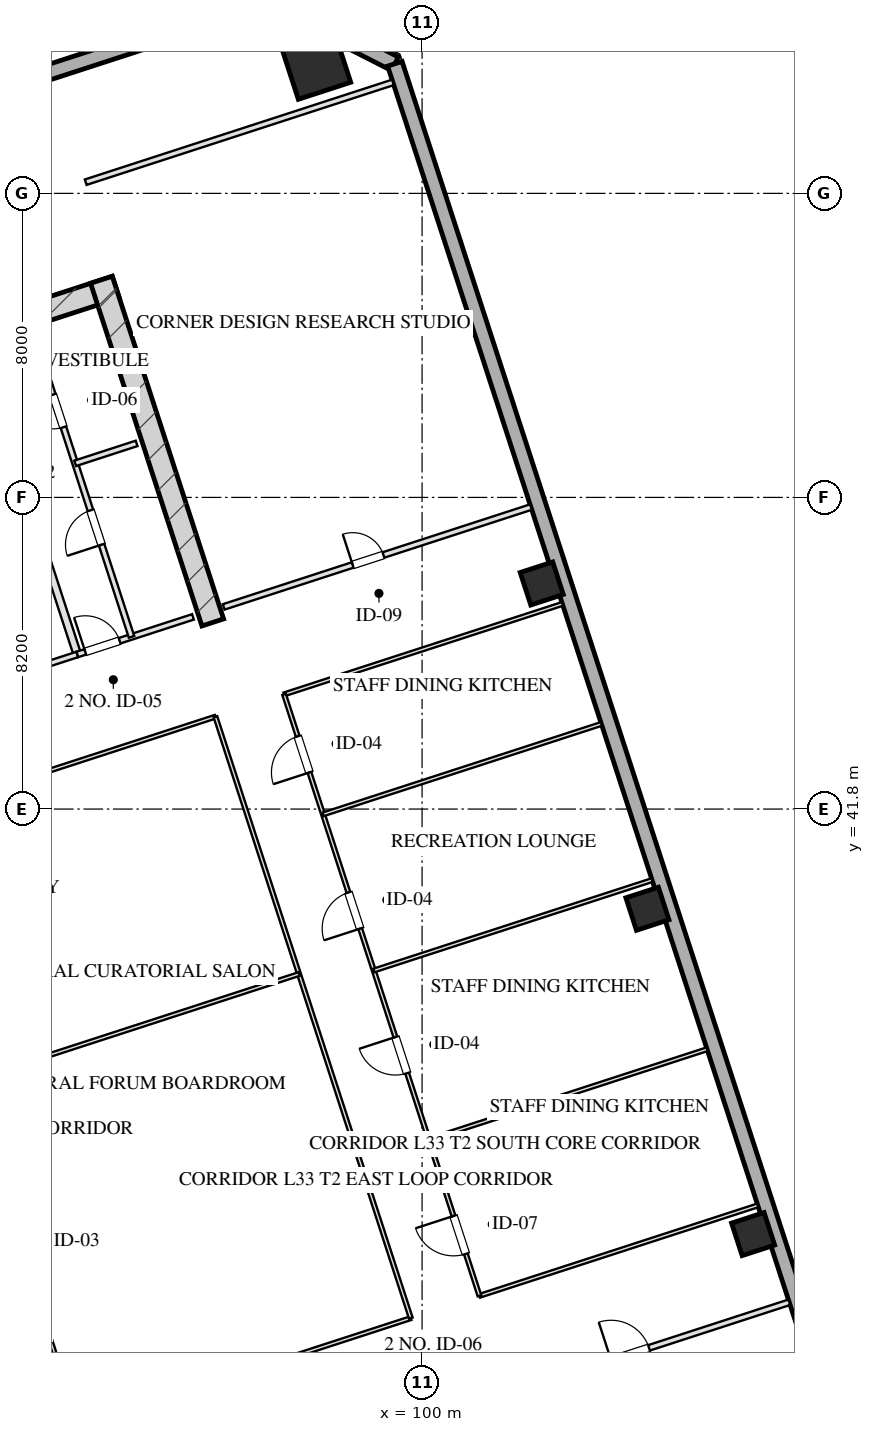
"""IFC4 building model, lengths in metres.
Left out: names, types, materials, properties, quantities, classifications, styles, units other than length and angle.
Written with IfcOpenShell. Run it as: python <this file> out.ifc"""

import sys

from ifc_helpers import new_model, si_unit, direction, frame, frame_2d, origin, origin_2d, place, context, subcontext, project, spatial, rectangle, hollow_rectangle, extrude, element, fill, save


model = new_model("IFC4")
c1 = context("Model", 3, precision=1e-05, world=origin(), true_north=direction((0.0, 1.0)))
c2 = subcontext(c1, "Body", "Model", "MODEL_VIEW")
j1 = project(units=[si_unit("LENGTHUNIT", "METRE"), si_unit("PLANEANGLEUNIT", "RADIAN")], contexts=[c1])
p1 = place(None, origin())
s1 = spatial("IfcSite", under=j1, at=p1, CompositionType="ELEMENT")
p2 = place(p1, origin())
s2 = spatial("IfcBuilding", under=s1, at=p2, CompositionType="ELEMENT")
p3 = place(p2, frame((0.0, 0.0, 127.65)))
s3 = spatial("IfcBuildingStorey", under=s2, at=p3, CompositionType="ELEMENT", Elevation=127.65)
p4 = place(p3, frame((76.344, 50.466, 0.0), z_axis=(0.0, 0.0, 1.0), x_axis=(0.951055727519, 0.309019421968, 0.0)))
e1 = element("IfcWall", 1, at=p4, inside=s3, PredefinedType="SHEAR", context=c2, shape_type="SweptSolid", body=[
    extrude(rectangle(XDim=16.4, YDim=0.6, at=frame_2d((8.2, 0.0))), origin(), (0.0, 0.0, 1.0), 3.45),
])
p5 = place(p3, frame((94.492, 46.71, 0.0), z_axis=(0.0, 0.0, 1.0), x_axis=(-0.309010370028, 0.95105866865, 0.0)))
e2 = element("IfcWall", 2, at=p5, inside=s3, PredefinedType="SHEAR", context=c2, shape_type="SweptSolid", body=[
    extrude(rectangle(XDim=9.48, YDim=0.6, at=frame_2d((4.74, 0.0))), origin(), (0.0, 0.0, 1.0), 3.45),
])
p6 = place(p3, frame((97.209, 61.388, 0.0), z_axis=(0.0, 0.0, 1.0), x_axis=(0.951056516295, 0.309016994375, 0.0)))
e3 = element("IfcColumn", 3, at=p6, inside=s3, PredefinedType="COLUMN", context=c2, shape_type="SweptSolid", body=[
    extrude(hollow_rectangle(XDim=1.45, YDim=1.45, WallThickness=0.05, at=origin_2d()), origin(), (0.0, 0.0, 1.0), 3.451),
])
for number, where, z_axis, x_axis in (
    (4, (108.711, 30.616, 0.0), (0.0, 0.0, 1.0), (0.951, 0.309, 0.0)),
    (5, (105.93, 39.176, 0.0), (0.0, 0.0, 1.0), (0.951, 0.309, 0.0)),
    (6, (103.149, 47.736, 0.0), (0.0, 0.0, 1.0), (0.951, 0.309, 0.0)),
):
    element("IfcColumn", number, at=place(p3, frame(where, z_axis=z_axis, x_axis=x_axis)), inside=s3, PredefinedType="COLUMN", context=c2, shape_type="SweptSolid", body=[
        extrude(hollow_rectangle(XDim=0.9, YDim=0.9, WallThickness=0.032, at=origin_2d()), origin(), (0.0, 0.0, 1.0), 3.451),
    ])
p7 = place(p3, frame((68.047, 53.995, 0.0), z_axis=(0.0, 0.0, 1.0), x_axis=(0.95105505922, 0.309021478754, 0.0)))
e7 = element("IfcWall", 7, at=p7, inside=s3, PredefinedType="SOLIDWALL", context=c2, shape_type="SweptSolid", body=[
    extrude(rectangle(XDim=29.4, YDim=0.4, at=frame_2d((14.7, 0.0))), origin(), (0.0, 0.0, 1.0), 2.61),
])
p8 = place(p3, frame((96.008, 63.08, 0.0), z_axis=(0.0, 0.0, 1.0), x_axis=(0.891001999643, -0.45399937955, 0.0)))
e8 = element("IfcWall", 8, at=p8, inside=s3, PredefinedType="SOLIDWALL", context=c2, shape_type="SweptSolid", body=[
    extrude(rectangle(XDim=3.677, YDim=0.4, at=frame_2d((1.839, 0.0))), origin(), (0.0, 0.0, 1.0), 2.61),
])
p9 = place(p3, frame((99.284, 61.41, 0.0), z_axis=(0.0, 0.0, 1.0), x_axis=(0.309017542002, -0.95105633836, 0.0)))
e9 = element("IfcWall", 9, at=p9, inside=s3, PredefinedType="SOLIDWALL", context=c2, shape_type="SweptSolid", body=[
    extrude(rectangle(XDim=46.4, YDim=0.4, at=frame_2d((23.2, 0.0))), origin(), (0.0, 0.0, 1.0), 2.61),
])
p10 = place(p3, frame((90.928, 45.868, 0.0), z_axis=(0.0, 0.0, 1.0), x_axis=(-0.309042196757, 0.951048327176, 0.0)))
e10 = element("IfcWall", 10, at=p10, inside=s3, PredefinedType="PARTITIONING", context=c2, shape_type="SweptSolid", body=[
    extrude(rectangle(XDim=8.43, YDim=0.2, at=frame_2d((4.215, 0.0))), origin(), (0.0, 0.0, 1.0), 3.175),
])
p11 = place(p3, frame((86.743, 44.508, 0.0), z_axis=(0.0, 0.0, 1.0), x_axis=(0.951063829732, 0.308994485023, 0.0)))
e11 = element("IfcWall", 11, at=p11, inside=s3, PredefinedType="PARTITIONING", context=c2, shape_type="SweptSolid", body=[
    extrude(rectangle(XDim=4.4, YDim=0.15, at=frame_2d((2.2, 0.0))), origin(), (0.0, 0.0, 1.0), 3.175),
])
p12 = place(p11, frame((1.45, 0.0, 0.0)))
e12 = element("IfcOpeningElement", 12, at=p12, cuts=e11, PredefinedType="OPENING", context=c2, shape_type="SweptSolid", body=[
    extrude(rectangle(XDim=1.5, YDim=2.05, at=frame_2d((0.75, 1.025))), frame((0.0, 0.085, 0.0), z_axis=(0.0, -1.0, 0.0), x_axis=(1.0, 0.0, 0.0)), (0.0, 0.0, 1.0), 0.17),
])
p13 = place(p3, frame((90.928, 45.868, 0.0), z_axis=(0.0, 0.0, 1.0), x_axis=(0.951059297078, 0.309008435874, 0.0)))
e13 = element("IfcWall", 13, at=p13, inside=s3, PredefinedType="PARTITIONING", context=c2, shape_type="SweptSolid", body=[
    extrude(rectangle(XDim=3.2, YDim=0.15, at=frame_2d((1.6, 0.0))), origin(), (0.0, 0.0, 1.0), 3.175),
])
p14 = place(p13, frame((0.22, 0.0, 0.0)))
e14 = element("IfcOpeningElement", 14, at=p14, cuts=e13, PredefinedType="OPENING", context=c2, shape_type="SweptSolid", body=[
    extrude(rectangle(XDim=0.95, YDim=2.05, at=frame_2d((0.475, 1.025))), frame((0.0, 0.085, 0.0), z_axis=(0.0, -1.0, 0.0), x_axis=(1.0, 0.0, 0.0)), (0.0, 0.0, 1.0), 0.17),
])
p15 = place(p3, frame((92.355, 46.331, 0.0), z_axis=(0.0, 0.0, 1.0), x_axis=(-0.309007490203, 0.951059604335, 0.0)))
e15 = element("IfcWall", 15, at=p15, inside=s3, PredefinedType="PARTITIONING", context=c2, shape_type="SweptSolid", body=[
    extrude(rectangle(XDim=8.43, YDim=0.15, at=frame_2d((4.215, 0.0))), origin(), (0.0, 0.0, 1.0), 3.175),
])
p16 = place(p15, frame((2.55, 0.0, 0.0)))
e16 = element("IfcOpeningElement", 16, at=p16, cuts=e15, PredefinedType="OPENING", context=c2, shape_type="SweptSolid", body=[
    extrude(rectangle(XDim=0.95, YDim=2.05, at=frame_2d((0.475, 1.025))), frame((0.0, 0.085, 0.0), z_axis=(0.0, -1.0, 0.0), x_axis=(1.0, 0.0, 0.0)), (0.0, 0.0, 1.0), 0.17),
])
p17 = place(p15, frame((5.8, 0.0, 0.0)))
e17 = element("IfcOpeningElement", 17, at=p17, cuts=e15, PredefinedType="OPENING", context=c2, shape_type="SweptSolid", body=[
    extrude(rectangle(XDim=0.9, YDim=2.05, at=frame_2d((0.45, 1.025))), frame((0.0, 0.085, 0.0), z_axis=(0.0, -1.0, 0.0), x_axis=(1.0, 0.0, 0.0)), (0.0, 0.0, 1.0), 0.17),
])
p18 = place(p3, frame((90.871, 50.896, 0.0), z_axis=(0.0, 0.0, 1.0), x_axis=(0.951054116971, 0.309024378638, 0.0)))
e18 = element("IfcWall", 18, at=p18, inside=s3, PredefinedType="PARTITIONING", context=c2, shape_type="SweptSolid", body=[
    extrude(rectangle(XDim=1.7, YDim=0.15, at=frame_2d((0.85, 0.0))), origin(), (0.0, 0.0, 1.0), 3.175),
])
p19 = place(p3, frame((101.578, 26.196, 0.0), z_axis=(0.0, 0.0, 1.0), x_axis=(0.951062770994, 0.308997743729, 0.0)))
e19 = element("IfcWall", 19, at=p19, inside=s3, PredefinedType="PARTITIONING", context=c2, shape_type="SweptSolid", body=[
    extrude(rectangle(XDim=8.5, YDim=0.15, at=frame_2d((4.25, 0.0))), origin(), (0.0, 0.0, 1.0), 3.175),
])
p20 = place(p19, frame((3.57, 0.0, 0.0)))
e20 = element("IfcOpeningElement", 20, at=p20, cuts=e19, PredefinedType="OPENING", context=c2, shape_type="SweptSolid", body=[
    extrude(rectangle(XDim=1.05, YDim=2.05, at=frame_2d((0.525, 1.025))), frame((0.0, 0.085, 0.0), z_axis=(0.0, -1.0, 0.0), x_axis=(1.0, 0.0, 0.0)), (0.0, 0.0, 1.0), 0.17),
])
p21 = place(p3, frame((91.149, 58.294, 0.0), z_axis=(0.0, 0.0, 1.0), x_axis=(0.951062770994, 0.308997743729, 0.0)))
e21 = element("IfcWall", 21, at=p21, inside=s3, PredefinedType="PARTITIONING", context=c2, shape_type="SweptSolid", body=[
    extrude(rectangle(XDim=8.5, YDim=0.15, at=frame_2d((4.25, 0.0))), origin(), (0.0, 0.0, 1.0), 3.175),
])
p22 = place(p3, frame((94.78, 47.119, 0.0), z_axis=(0.0, 0.0, 1.0), x_axis=(0.951054329824, 0.309023723562, 0.0)))
e22 = element("IfcWall", 22, at=p22, inside=s3, PredefinedType="PARTITIONING", context=c2, shape_type="SweptSolid", body=[
    extrude(rectangle(XDim=8.5, YDim=0.15, at=frame_2d((4.25, 0.0))), origin(), (0.0, 0.0, 1.0), 3.175),
])
p23 = place(p22, frame((3.57, 0.0, 0.0)))
e23 = element("IfcOpeningElement", 23, at=p23, cuts=e22, PredefinedType="OPENING", context=c2, shape_type="SweptSolid", body=[
    extrude(rectangle(XDim=0.85, YDim=2.05, at=frame_2d((0.425, 1.025))), frame((0.0, 0.085, 0.0), z_axis=(0.0, -1.0, 0.0), x_axis=(1.0, 0.0, 0.0)), (0.0, 0.0, 1.0), 0.17),
])
p24 = place(p3, frame((90.954, 25.562, 0.0), z_axis=(0.0, 0.0, 1.0), x_axis=(0.951052398814, 0.309029666393, 0.0)))
e24 = element("IfcWall", 24, at=p24, inside=s3, PredefinedType="MOVABLE", context=c2, shape_type="SweptSolid", body=[
    extrude(rectangle(XDim=9.2, YDim=0.1, at=frame_2d((4.6, 0.0))), origin(), (0.0, 0.0, 1.0), 3.175),
])
p25 = place(p3, frame((101.511, 28.992, 0.0), z_axis=(0.0, 0.0, 1.0), x_axis=(0.951056202154, 0.3090179612, 0.0)))
e25 = element("IfcWall", 25, at=p25, inside=s3, PredefinedType="MOVABLE", context=c2, shape_type="SweptSolid", body=[
    extrude(rectangle(XDim=7.7, YDim=0.1, at=frame_2d((3.85, 0.0))), origin(), (0.0, 0.0, 1.0), 3.175),
])
p26 = place(p3, frame((85.812, 41.387, 0.0), z_axis=(0.0, 0.0, 1.0), x_axis=(0.951054933035, 0.309021867106, 0.0)))
e26 = element("IfcWall", 26, at=p26, inside=s3, PredefinedType="MOVABLE", context=c2, shape_type="SweptSolid", body=[
    extrude(rectangle(XDim=9.2, YDim=0.1, at=frame_2d((4.6, 0.0))), origin(), (0.0, 0.0, 1.0), 3.175),
])
p27 = place(p3, frame((96.369, 44.818, 0.0), z_axis=(0.0, 0.0, 1.0), x_axis=(0.9510592298, 0.30900864294, 0.0)))
e27 = element("IfcWall", 27, at=p27, inside=s3, PredefinedType="MOVABLE", context=c2, shape_type="SweptSolid", body=[
    extrude(rectangle(XDim=7.7, YDim=0.1, at=frame_2d((3.85, 0.0))), origin(), (0.0, 0.0, 1.0), 3.175),
])
p28 = place(p3, frame((90.954, 25.562, 0.0), z_axis=(0.0, 0.0, 1.0), x_axis=(-0.30901773025, 0.951056277195, 0.0)))
e28 = element("IfcWall", 28, at=p28, inside=s3, PredefinedType="MOVABLE", context=c2, shape_type="SweptSolid", body=[
    extrude(rectangle(XDim=16.64, YDim=0.1, at=frame_2d((8.32, 0.0))), origin(), (0.0, 0.0, 1.0), 3.175),
])
p29 = place(p28, frame((4.284, 0.0, 0.0)))
e29 = element("IfcOpeningElement", 29, at=p29, cuts=e28, PredefinedType="OPENING", context=c2, shape_type="SweptSolid", body=[
    extrude(rectangle(XDim=1.1, YDim=2.05, at=frame_2d((0.55, 1.025))), frame((0.0, 0.06, 0.0), z_axis=(0.0, -1.0, 0.0), x_axis=(1.0, 0.0, 0.0)), (0.0, 0.0, 1.0), 0.12),
])
p30 = place(p28, frame((12.724, 0.0, 0.0)))
e30 = element("IfcOpeningElement", 30, at=p30, cuts=e28, PredefinedType="OPENING", context=c2, shape_type="SweptSolid", body=[
    extrude(rectangle(XDim=1.1, YDim=2.05, at=frame_2d((0.55, 1.025))), frame((0.0, 0.06, 0.0), z_axis=(0.0, -1.0, 0.0), x_axis=(1.0, 0.0, 0.0)), (0.0, 0.0, 1.0), 0.12),
])
p31 = place(p3, frame((99.704, 28.405, 0.0), z_axis=(0.0, 0.0, 1.0), x_axis=(-0.309004459387, 0.951060589068, 0.0)))
e31 = element("IfcWall", 31, at=p31, inside=s3, PredefinedType="MOVABLE", context=c2, shape_type="SweptSolid", body=[
    extrude(rectangle(XDim=16.64, YDim=0.1, at=frame_2d((8.32, 0.0))), origin(), (0.0, 0.0, 1.0), 3.175),
])
p32 = place(p3, frame((101.511, 28.992, 0.0), z_axis=(0.0, 0.0, 1.0), x_axis=(-0.30901773025, 0.951056277195, 0.0)))
e32 = element("IfcWall", 32, at=p32, inside=s3, PredefinedType="MOVABLE", context=c2, shape_type="SweptSolid", body=[
    extrude(rectangle(XDim=16.64, YDim=0.1, at=frame_2d((8.32, 0.0))), origin(), (0.0, 0.0, 1.0), 3.175),
])
p33 = place(p32, frame((1.16, 0.0, 0.0)))
e33 = element("IfcOpeningElement", 33, at=p33, cuts=e32, PredefinedType="OPENING", context=c2, shape_type="SweptSolid", body=[
    extrude(rectangle(XDim=1.05, YDim=2.05, at=frame_2d((0.525, 1.025))), frame((0.0, 0.06, 0.0), z_axis=(0.0, -1.0, 0.0), x_axis=(1.0, 0.0, 0.0)), (0.0, 0.0, 1.0), 0.12),
])
p34 = place(p32, frame((6.16, 0.0, 0.0)))
e34 = element("IfcOpeningElement", 34, at=p34, cuts=e32, PredefinedType="OPENING", context=c2, shape_type="SweptSolid", body=[
    extrude(rectangle(XDim=1.0, YDim=2.05, at=frame_2d((0.5, 1.025))), frame((0.0, 0.06, 0.0), z_axis=(0.0, -1.0, 0.0), x_axis=(1.0, 0.0, 0.0)), (0.0, 0.0, 1.0), 0.12),
])
p35 = place(p32, frame((10.16, 0.0, 0.0)))
e35 = element("IfcOpeningElement", 35, at=p35, cuts=e32, PredefinedType="OPENING", context=c2, shape_type="SweptSolid", body=[
    extrude(rectangle(XDim=1.0, YDim=2.05, at=frame_2d((0.5, 1.025))), frame((0.0, 0.06, 0.0), z_axis=(0.0, -1.0, 0.0), x_axis=(1.0, 0.0, 0.0)), (0.0, 0.0, 1.0), 0.12),
])
p36 = place(p32, frame((14.48, 0.0, 0.0)))
e36 = element("IfcOpeningElement", 36, at=p36, cuts=e32, PredefinedType="OPENING", context=c2, shape_type="SweptSolid", body=[
    extrude(rectangle(XDim=1.0, YDim=2.05, at=frame_2d((0.5, 1.025))), frame((0.0, 0.06, 0.0), z_axis=(0.0, -1.0, 0.0), x_axis=(1.0, 0.0, 0.0)), (0.0, 0.0, 1.0), 0.12),
])
p37 = place(p3, frame((88.012, 34.616, 0.0), z_axis=(0.0, 0.0, 1.0), x_axis=(0.951054933035, 0.309021867106, 0.0)))
e37 = element("IfcWall", 37, at=p37, inside=s3, PredefinedType="MOVABLE", context=c2, shape_type="SweptSolid", body=[
    extrude(rectangle(XDim=9.2, YDim=0.1, at=frame_2d((4.6, 0.0))), origin(), (0.0, 0.0, 1.0), 3.175),
])
p38 = place(p3, frame((100.176, 33.101, 0.0), z_axis=(0.0, 0.0, 1.0), x_axis=(0.951056202154, 0.3090179612, 0.0)))
e38 = element("IfcWall", 38, at=p38, inside=s3, PredefinedType="MOVABLE", context=c2, shape_type="SweptSolid", body=[
    extrude(rectangle(XDim=7.7, YDim=0.1, at=frame_2d((3.85, 0.0))), origin(), (0.0, 0.0, 1.0), 3.175),
])
for number, where, z_axis, x_axis in (
    (39, (98.73, 37.552, 0.0), (0.0, 0.0, 1.0), (0.951, 0.309, 0.0)),
    (40, (97.395, 41.66, 0.0), (0.0, 0.0, 1.0), (0.951, 0.309, 0.0)),
):
    element("IfcWall", number, at=place(p3, frame(where, z_axis=z_axis, x_axis=x_axis)), inside=s3, PredefinedType="MOVABLE", context=c2, shape_type="SweptSolid", body=[
        extrude(rectangle(XDim=7.7, YDim=0.1, at=frame_2d((3.85, 0.0))), origin(), (0.0, 0.0, 1.0), 3.175),
    ])
p39 = place(p14, origin())
e41 = element("IfcDoor", 41, at=p39, inside=s3, OperationType="SINGLE_SWING_LEFT", PredefinedType="DOOR", context=c2, shape_type="SweptSolid", body=[
    extrude(rectangle(XDim=0.95, YDim=2.05, at=frame_2d((0.475, 1.025))), frame((0.0, 0.025, 0.0), z_axis=(0.0, -1.0, 0.0), x_axis=(1.0, 0.0, 0.0)), (0.0, 0.0, 1.0), 0.05),
])
fill(e14, e41)
p40 = place(p16, origin())
e42 = element("IfcDoor", 42, at=p40, inside=s3, OperationType="SINGLE_SWING_LEFT", PredefinedType="DOOR", context=c2, shape_type="SweptSolid", body=[
    extrude(rectangle(XDim=0.95, YDim=2.05, at=frame_2d((0.475, 1.025))), frame((0.0, 0.025, 0.0), z_axis=(0.0, -1.0, 0.0), x_axis=(1.0, 0.0, 0.0)), (0.0, 0.0, 1.0), 0.05),
])
fill(e16, e42)
p41 = place(p17, origin())
e43 = element("IfcDoor", 43, at=p41, inside=s3, OperationType="SINGLE_SWING_RIGHT", PredefinedType="DOOR", context=c2, shape_type="SweptSolid", body=[
    extrude(rectangle(XDim=0.9, YDim=2.05, at=frame_2d((0.45, 1.025))), frame((0.0, 0.025, 0.0), z_axis=(0.0, -1.0, 0.0), x_axis=(1.0, 0.0, 0.0)), (0.0, 0.0, 1.0), 0.05),
])
fill(e17, e43)
p42 = place(p20, origin())
e44 = element("IfcDoor", 44, at=p42, inside=s3, OperationType="SINGLE_SWING_LEFT", PredefinedType="DOOR", context=c2, shape_type="SweptSolid", body=[
    extrude(rectangle(XDim=1.05, YDim=2.05, at=frame_2d((0.525, 1.025))), frame((0.0, 0.025, 0.0), z_axis=(0.0, -1.0, 0.0), x_axis=(1.0, 0.0, 0.0)), (0.0, 0.0, 1.0), 0.05),
])
fill(e20, e44)
p43 = place(p23, origin())
e45 = element("IfcDoor", 45, at=p43, inside=s3, OperationType="SINGLE_SWING_LEFT", PredefinedType="DOOR", context=c2, shape_type="SweptSolid", body=[
    extrude(rectangle(XDim=0.85, YDim=2.05, at=frame_2d((0.425, 1.025))), frame((0.0, 0.025, 0.0), z_axis=(0.0, -1.0, 0.0), x_axis=(1.0, 0.0, 0.0)), (0.0, 0.0, 1.0), 0.05),
])
fill(e23, e45)
p44 = place(p33, origin())
e46 = element("IfcDoor", 46, at=p44, inside=s3, OperationType="SINGLE_SWING_RIGHT", PredefinedType="DOOR", context=c2, shape_type="SweptSolid", body=[
    extrude(rectangle(XDim=1.05, YDim=2.05, at=frame_2d((0.525, 1.025))), frame((0.0, 0.025, 0.0), z_axis=(0.0, -1.0, 0.0), x_axis=(1.0, 0.0, 0.0)), (0.0, 0.0, 1.0), 0.05),
])
fill(e33, e46)
p45 = place(p34, origin())
e47 = element("IfcDoor", 47, at=p45, inside=s3, OperationType="SINGLE_SWING_RIGHT", PredefinedType="DOOR", context=c2, shape_type="SweptSolid", body=[
    extrude(rectangle(XDim=1.0, YDim=2.05, at=frame_2d((0.5, 1.025))), frame((0.0, 0.025, 0.0), z_axis=(0.0, -1.0, 0.0), x_axis=(1.0, 0.0, 0.0)), (0.0, 0.0, 1.0), 0.05),
])
fill(e34, e47)
p46 = place(p35, origin())
e48 = element("IfcDoor", 48, at=p46, inside=s3, OperationType="SINGLE_SWING_LEFT", PredefinedType="DOOR", context=c2, shape_type="SweptSolid", body=[
    extrude(rectangle(XDim=1.0, YDim=2.05, at=frame_2d((0.5, 1.025))), frame((0.0, 0.025, 0.0), z_axis=(0.0, -1.0, 0.0), x_axis=(1.0, 0.0, 0.0)), (0.0, 0.0, 1.0), 0.05),
])
fill(e35, e48)
p47 = place(p36, origin())
e49 = element("IfcDoor", 49, at=p47, inside=s3, OperationType="SINGLE_SWING_LEFT", PredefinedType="DOOR", context=c2, shape_type="SweptSolid", body=[
    extrude(rectangle(XDim=1.0, YDim=2.05, at=frame_2d((0.5, 1.025))), frame((0.0, 0.025, 0.0), z_axis=(0.0, -1.0, 0.0), x_axis=(1.0, 0.0, 0.0)), (0.0, 0.0, 1.0), 0.05),
])
fill(e36, e49)
save(model, sys.argv[1])
